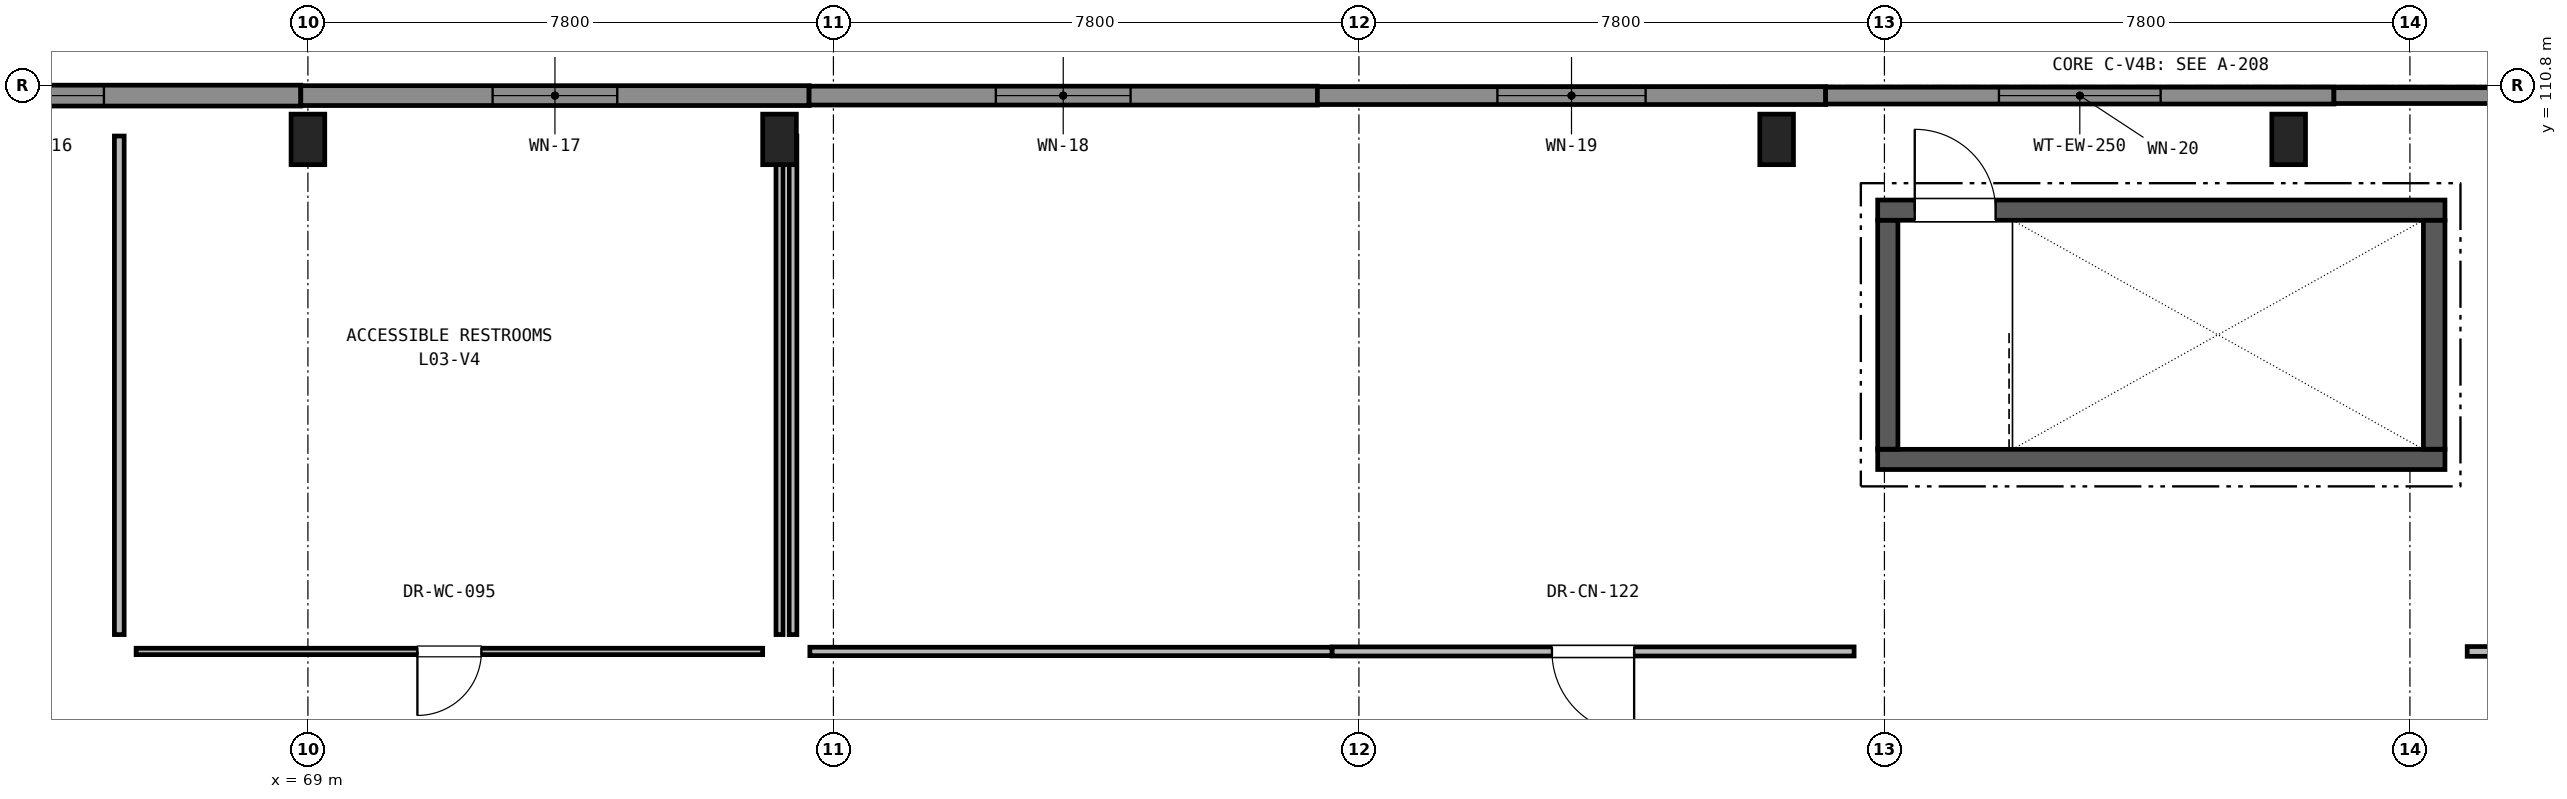
"""IFC4 building model, lengths in metres.
Left out: names, types, materials, properties, quantities, classifications, styles, units other than length and angle.
Written with IfcOpenShell. Run it as: python <this file> out.ifc"""

import sys

from ifc_helpers import new_model, si_unit, direction, frame, frame_2d, origin, origin_2d, place, context, subcontext, project, spatial, rectangle, extrude, element, fill, save


model = new_model("IFC4")
c1 = context("Model", 3, precision=1e-05, world=origin(), true_north=direction((0.0, 1.0)))
c2 = subcontext(c1, "Body", "Model", "MODEL_VIEW")
j1 = project(units=[si_unit("LENGTHUNIT", "METRE"), si_unit("PLANEANGLEUNIT", "RADIAN")], contexts=[c1])
p1 = place(None, origin())
s1 = spatial("IfcSite", under=j1, at=p1, CompositionType="ELEMENT")
p2 = place(p1, origin())
s2 = spatial("IfcBuilding", under=s1, at=p2, CompositionType="ELEMENT")
p3 = place(p2, frame((0.0, 0.0, 13.6)))
s3 = spatial("IfcBuildingStorey", under=s2, at=p3, CompositionType="ELEMENT", Elevation=13.6)
for number, where, z_axis, x_axis in (
    (1, (69.0, 110.0, 0.0), (0.0, 0.0, 1.0), (1.0, 0.0, 0.0)),
    (2, (76.0, 110.0, 0.0), (0.0, 0.0, 1.0), (1.0, 0.0, 0.0)),
    (3, (90.8, 110.0, 0.0), (0.0, 0.0, 1.0), (1.0, 0.0, 0.0)),
    (4, (98.4, 110.0, 0.0), (0.0, 0.0, 1.0), (1.0, 0.0, 0.0)),
):
    element("IfcColumn", number, at=place(p3, frame(where, z_axis=z_axis, x_axis=x_axis)), inside=s3, PredefinedType="COLUMN", context=c2, shape_type="SweptSolid", body=[
        extrude(rectangle(XDim=0.5, YDim=0.75, at=origin_2d()), origin(), (0.0, 0.0, 1.0), 4.08),
    ])
p4 = place(p3, frame((61.35, 110.65, 0.0), z_axis=(0.0, 0.0, 1.0), x_axis=(1.0, 0.0, 0.0)))
e5 = element("IfcWall", 5, at=p4, inside=s3, PredefinedType="SOLIDWALL", context=c2, shape_type="SweptSolid", body=[
    extrude(rectangle(XDim=7.544, YDim=0.31, at=frame_2d((3.772, 0.0))), origin(), (0.0, 0.0, 1.0), 3.775),
])
p5 = place(p4, frame((2.922, 0.0, 0.9)))
e6 = element("IfcOpeningElement", 6, at=p5, cuts=e5, PredefinedType="OPENING", context=c2, shape_type="SweptSolid", body=[
    extrude(rectangle(XDim=1.7, YDim=1.75, at=frame_2d((0.85, 0.875))), frame((0.0, 0.165, 0.0), z_axis=(0.0, -1.0, 0.0), x_axis=(1.0, 0.0, 0.0)), (0.0, 0.0, 1.0), 0.33),
])
p6 = place(p3, frame((68.894, 110.65, 0.0), z_axis=(0.0, 0.0, 1.0), x_axis=(1.0, 0.0, 0.0)))
e7 = element("IfcWall", 7, at=p6, inside=s3, PredefinedType="SOLIDWALL", context=c2, shape_type="SweptSolid", body=[
    extrude(rectangle(XDim=7.545, YDim=0.295, at=frame_2d((3.772, 0.0))), origin(), (0.0, 0.0, 1.0), 3.775),
])
p7 = place(p6, frame((2.847, 0.0, 0.9)))
e8 = element("IfcOpeningElement", 8, at=p7, cuts=e7, PredefinedType="OPENING", context=c2, shape_type="SweptSolid", body=[
    extrude(rectangle(XDim=1.85, YDim=1.75, at=frame_2d((0.925, 0.875))), frame((0.0, 0.157, 0.0), z_axis=(0.0, -1.0, 0.0), x_axis=(1.0, 0.0, 0.0)), (0.0, 0.0, 1.0), 0.315),
])
p8 = place(p3, frame((76.439, 110.65, 0.0), z_axis=(0.0, 0.0, 1.0), x_axis=(1.0, 0.0, 0.0)))
e9 = element("IfcWall", 9, at=p8, inside=s3, PredefinedType="SOLIDWALL", context=c2, shape_type="SweptSolid", body=[
    extrude(rectangle(XDim=7.544, YDim=0.28, at=frame_2d((3.772, 0.0))), origin(), (0.0, 0.0, 1.0), 3.775),
])
p9 = place(p8, frame((2.772, 0.0, 0.9)))
e10 = element("IfcOpeningElement", 10, at=p9, cuts=e9, PredefinedType="OPENING", context=c2, shape_type="SweptSolid", body=[
    extrude(rectangle(XDim=2.0, YDim=1.75, at=frame_2d((1.0, 0.875))), frame((0.0, 0.15, 0.0), z_axis=(0.0, -1.0, 0.0), x_axis=(1.0, 0.0, 0.0)), (0.0, 0.0, 1.0), 0.3),
])
p10 = place(p3, frame((83.983, 110.65, 0.0), z_axis=(0.0, 0.0, 1.0), x_axis=(1.0, 0.0, 0.0)))
e11 = element("IfcWall", 11, at=p10, inside=s3, PredefinedType="SOLIDWALL", context=c2, shape_type="SweptSolid", body=[
    extrude(rectangle(XDim=7.544, YDim=0.265, at=frame_2d((3.772, 0.0))), origin(), (0.0, 0.0, 1.0), 3.775),
])
p11 = place(p10, frame((2.672, 0.0, 0.9)))
e12 = element("IfcOpeningElement", 12, at=p11, cuts=e11, PredefinedType="OPENING", context=c2, shape_type="SweptSolid", body=[
    extrude(rectangle(XDim=2.2, YDim=1.75, at=frame_2d((1.1, 0.875))), frame((0.0, 0.142, 0.0), z_axis=(0.0, -1.0, 0.0), x_axis=(1.0, 0.0, 0.0)), (0.0, 0.0, 1.0), 0.285),
])
p12 = place(p3, frame((91.528, 110.65, 0.0), z_axis=(0.0, 0.0, 1.0), x_axis=(1.0, 0.0, 0.0)))
e13 = element("IfcWall", 13, at=p12, inside=s3, PredefinedType="SOLIDWALL", context=c2, shape_type="SweptSolid", body=[
    extrude(rectangle(XDim=7.544, YDim=0.25, at=frame_2d((3.772, 0.0))), origin(), (0.0, 0.0, 1.0), 3.775),
])
p13 = place(p12, frame((2.572, 0.0, 0.9)))
e14 = element("IfcOpeningElement", 14, at=p13, cuts=e13, PredefinedType="OPENING", context=c2, shape_type="SweptSolid", body=[
    extrude(rectangle(XDim=2.4, YDim=1.75, at=frame_2d((1.2, 0.875))), frame((0.0, 0.135, 0.0), z_axis=(0.0, -1.0, 0.0), x_axis=(1.0, 0.0, 0.0)), (0.0, 0.0, 1.0), 0.27),
])
p14 = place(p3, frame((99.072, 110.65, 0.0), z_axis=(0.0, 0.0, 1.0), x_axis=(1.0, 0.0, 0.0)))
e15 = element("IfcWall", 15, at=p14, inside=s3, PredefinedType="SOLIDWALL", context=c2, shape_type="SweptSolid", body=[
    extrude(rectangle(XDim=7.544, YDim=0.235, at=frame_2d((3.772, 0.0))), origin(), (0.0, 0.0, 1.0), 3.775),
])
p15 = place(p14, frame((3.197, 0.0, 0.9)))
e16 = element("IfcOpeningElement", 16, at=p15, cuts=e15, PredefinedType="OPENING", context=c2, shape_type="SweptSolid", body=[
    extrude(rectangle(XDim=1.15, YDim=2.0, at=frame_2d((0.575, 1.0))), frame((0.0, 0.127, 0.0), z_axis=(0.0, -1.0, 0.0), x_axis=(1.0, 0.0, 0.0)), (0.0, 0.0, 1.0), 0.255),
])
p16 = place(p3, frame((92.3, 105.25, 0.0), z_axis=(0.0, 0.0, 1.0), x_axis=(1.0, 0.0, 0.0)))
e17 = element("IfcWall", 17, at=p16, inside=s3, PredefinedType="SHEAR", context=c2, shape_type="SweptSolid", body=[
    extrude(rectangle(XDim=8.42, YDim=0.3, at=frame_2d((4.21, 0.0))), origin(), (0.0, 0.0, 1.0), 3.775),
])
p17 = place(p3, frame((92.3, 108.95, 0.0), z_axis=(0.0, 0.0, 1.0), x_axis=(1.0, 0.0, 0.0)))
e18 = element("IfcWall", 18, at=p17, inside=s3, PredefinedType="SHEAR", context=c2, shape_type="SweptSolid", body=[
    extrude(rectangle(XDim=8.42, YDim=0.3, at=frame_2d((4.21, 0.0))), origin(), (0.0, 0.0, 1.0), 3.775),
])
p18 = place(p17, frame((0.55, 0.0, 0.0)))
e19 = element("IfcOpeningElement", 19, at=p18, cuts=e18, PredefinedType="OPENING", context=c2, shape_type="SweptSolid", body=[
    extrude(rectangle(XDim=1.2, YDim=2.2, at=frame_2d((0.6, 1.1))), frame((0.0, 0.16, 0.0), z_axis=(0.0, -1.0, 0.0), x_axis=(1.0, 0.0, 0.0)), (0.0, 0.0, 1.0), 0.32),
])
p19 = place(p3, frame((92.45, 105.402, 0.0), z_axis=(0.0, 0.0, 1.0), x_axis=(0.0, 1.0, 0.0)))
e20 = element("IfcWall", 20, at=p19, inside=s3, PredefinedType="SHEAR", context=c2, shape_type="SweptSolid", body=[
    extrude(rectangle(XDim=3.396, YDim=0.3, at=frame_2d((1.698, 0.0))), origin(), (0.0, 0.0, 1.0), 3.775),
])
p20 = place(p3, frame((100.56, 105.402, 0.0), z_axis=(0.0, 0.0, 1.0), x_axis=(0.0, 1.0, 0.0)))
e21 = element("IfcWall", 21, at=p20, inside=s3, PredefinedType="SHEAR", context=c2, shape_type="SweptSolid", body=[
    extrude(rectangle(XDim=3.396, YDim=0.32, at=frame_2d((1.698, 0.0))), origin(), (0.0, 0.0, 1.0), 3.775),
])
p21 = place(p3, frame((76.0, 110.05, 0.0), z_axis=(0.0, 0.0, 1.0), x_axis=(0.0, -1.0, 0.0)))
e22 = element("IfcWall", 22, at=p21, inside=s3, PredefinedType="PARTITIONING", context=c2, shape_type="SweptSolid", body=[
    extrude(rectangle(XDim=7.4, YDim=0.105, at=frame_2d((3.7, 0.0))), origin(), (0.0, 0.0, 1.0), 2.975),
])
p22 = place(p3, frame((75.75, 102.4, 0.0), z_axis=(0.0, 0.0, 1.0), x_axis=(-1.0, 0.0, 0.0)))
e23 = element("IfcWall", 23, at=p22, inside=s3, PredefinedType="PARTITIONING", context=c2, shape_type="SweptSolid", body=[
    extrude(rectangle(XDim=9.3, YDim=0.095, at=frame_2d((4.65, 0.0))), origin(), (0.0, 0.0, 1.0), 3.025),
])
p23 = place(p22, frame((4.175, 0.0, 0.0)))
e24 = element("IfcOpeningElement", 24, at=p23, cuts=e23, PredefinedType="OPENING", context=c2, shape_type="SweptSolid", body=[
    extrude(rectangle(XDim=0.95, YDim=2.15, at=frame_2d((0.475, 1.075))), frame((0.0, 0.057, 0.0), z_axis=(0.0, -1.0, 0.0), x_axis=(1.0, 0.0, 0.0)), (0.0, 0.0, 1.0), 0.115),
])
p24 = place(p3, frame((66.2, 102.65, 0.0), z_axis=(0.0, 0.0, 1.0), x_axis=(0.0, 1.0, 0.0)))
e25 = element("IfcWall", 25, at=p24, inside=s3, PredefinedType="PARTITIONING", context=c2, shape_type="SweptSolid", body=[
    extrude(rectangle(XDim=7.4, YDim=0.145, at=frame_2d((3.7, 0.0))), origin(), (0.0, 0.0, 1.0), 3.075),
])
p25 = place(p3, frame((91.95, 102.4, 0.0), z_axis=(0.0, 0.0, 1.0), x_axis=(-1.0, 0.0, 0.0)))
e26 = element("IfcWall", 26, at=p25, inside=s3, PredefinedType="PARTITIONING", context=c2, shape_type="SweptSolid", body=[
    extrude(rectangle(XDim=7.75, YDim=0.135, at=frame_2d((3.875, 0.0))), origin(), (0.0, 0.0, 1.0), 3.125),
])
p26 = place(p25, frame((3.265, 0.0, 0.0)))
e27 = element("IfcOpeningElement", 27, at=p26, cuts=e26, PredefinedType="OPENING", context=c2, shape_type="SweptSolid", body=[
    extrude(rectangle(XDim=1.22, YDim=2.2, at=frame_2d((0.61, 1.1))), frame((0.0, 0.077, 0.0), z_axis=(0.0, -1.0, 0.0), x_axis=(1.0, 0.0, 0.0)), (0.0, 0.0, 1.0), 0.155),
])
p27 = place(p3, frame((84.2, 102.4, 0.0), z_axis=(0.0, 0.0, 1.0), x_axis=(-1.0, 0.0, 0.0)))
e28 = element("IfcWall", 28, at=p27, inside=s3, PredefinedType="PARTITIONING", context=c2, shape_type="SweptSolid", body=[
    extrude(rectangle(XDim=7.75, YDim=0.125, at=frame_2d((3.875, 0.0))), origin(), (0.0, 0.0, 1.0), 3.775),
])
p28 = place(p3, frame((76.2, 102.65, 0.0), z_axis=(0.0, 0.0, 1.0), x_axis=(0.0, 1.0, 0.0)))
e29 = element("IfcWall", 29, at=p28, inside=s3, PredefinedType="PARTITIONING", context=c2, shape_type="SweptSolid", body=[
    extrude(rectangle(XDim=7.4, YDim=0.115, at=frame_2d((3.7, 0.0))), origin(), (0.0, 0.0, 1.0), 2.975),
])
p29 = place(p3, frame((106.483, 102.4, 0.0), z_axis=(0.0, 0.0, 1.0), x_axis=(-1.0, 0.0, 0.0)))
e30 = element("IfcWall", 30, at=p29, inside=s3, PredefinedType="PARTITIONING", context=c2, shape_type="SweptSolid", body=[
    extrude(rectangle(XDim=5.433, YDim=0.145, at=frame_2d((2.716, 0.0))), origin(), (0.0, 0.0, 1.0), 3.075),
])
p30 = place(p5, origin())
e31 = element("IfcWindow", 31, at=p30, inside=s3, PartitioningType="SINGLE_PANEL", PredefinedType="WINDOW", context=c2, shape_type="SweptSolid", body=[
    extrude(rectangle(XDim=1.7, YDim=1.75, at=frame_2d((0.85, 0.875))), frame((0.0, 0.03, 0.0), z_axis=(0.0, -1.0, 0.0), x_axis=(1.0, 0.0, 0.0)), (0.0, 0.0, 1.0), 0.06),
])
fill(e6, e31)
p31 = place(p7, origin())
e32 = element("IfcWindow", 32, at=p31, inside=s3, PartitioningType="SINGLE_PANEL", PredefinedType="WINDOW", context=c2, shape_type="SweptSolid", body=[
    extrude(rectangle(XDim=1.85, YDim=1.75, at=frame_2d((0.925, 0.875))), frame((0.0, 0.03, 0.0), z_axis=(0.0, -1.0, 0.0), x_axis=(1.0, 0.0, 0.0)), (0.0, 0.0, 1.0), 0.06),
])
fill(e8, e32)
p32 = place(p9, origin())
e33 = element("IfcWindow", 33, at=p32, inside=s3, PartitioningType="SINGLE_PANEL", PredefinedType="WINDOW", context=c2, shape_type="SweptSolid", body=[
    extrude(rectangle(XDim=2.0, YDim=1.75, at=frame_2d((1.0, 0.875))), frame((0.0, 0.03, 0.0), z_axis=(0.0, -1.0, 0.0), x_axis=(1.0, 0.0, 0.0)), (0.0, 0.0, 1.0), 0.06),
])
fill(e10, e33)
p33 = place(p11, origin())
e34 = element("IfcWindow", 34, at=p33, inside=s3, PartitioningType="SINGLE_PANEL", PredefinedType="WINDOW", context=c2, shape_type="SweptSolid", body=[
    extrude(rectangle(XDim=2.2, YDim=1.75, at=frame_2d((1.1, 0.875))), frame((0.0, 0.03, 0.0), z_axis=(0.0, -1.0, 0.0), x_axis=(1.0, 0.0, 0.0)), (0.0, 0.0, 1.0), 0.06),
])
fill(e12, e34)
p34 = place(p13, origin())
e35 = element("IfcWindow", 35, at=p34, inside=s3, PartitioningType="SINGLE_PANEL", PredefinedType="WINDOW", context=c2, shape_type="SweptSolid", body=[
    extrude(rectangle(XDim=2.4, YDim=1.75, at=frame_2d((1.2, 0.875))), frame((0.0, 0.03, 0.0), z_axis=(0.0, -1.0, 0.0), x_axis=(1.0, 0.0, 0.0)), (0.0, 0.0, 1.0), 0.06),
])
fill(e14, e35)
p35 = place(p18, origin())
e36 = element("IfcDoor", 36, at=p35, inside=s3, OperationType="SINGLE_SWING_LEFT", PredefinedType="DOOR", context=c2, shape_type="SweptSolid", body=[
    extrude(rectangle(XDim=1.2, YDim=2.2, at=frame_2d((0.6, 1.1))), frame((0.0, 0.025, 0.0), z_axis=(0.0, -1.0, 0.0), x_axis=(1.0, 0.0, 0.0)), (0.0, 0.0, 1.0), 0.05),
])
fill(e19, e36)
p36 = place(p23, origin())
e37 = element("IfcDoor", 37, at=p36, inside=s3, OperationType="SINGLE_SWING_RIGHT", PredefinedType="DOOR", context=c2, shape_type="SweptSolid", body=[
    extrude(rectangle(XDim=0.95, YDim=2.15, at=frame_2d((0.475, 1.075))), frame((0.0, 0.025, 0.0), z_axis=(0.0, -1.0, 0.0), x_axis=(1.0, 0.0, 0.0)), (0.0, 0.0, 1.0), 0.05),
])
fill(e24, e37)
p37 = place(p26, origin())
e38 = element("IfcDoor", 38, at=p37, inside=s3, OperationType="SINGLE_SWING_LEFT", PredefinedType="DOOR", context=c2, shape_type="SweptSolid", body=[
    extrude(rectangle(XDim=1.22, YDim=2.2, at=frame_2d((0.61, 1.1))), frame((0.0, 0.025, 0.0), z_axis=(0.0, -1.0, 0.0), x_axis=(1.0, 0.0, 0.0)), (0.0, 0.0, 1.0), 0.05),
])
fill(e27, e38)
save(model, sys.argv[1])
